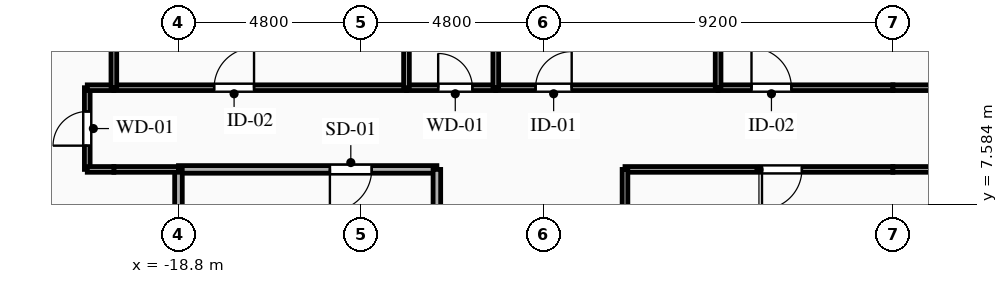
"""IFC4 building model, lengths in metres.
Left out: names, types, materials, properties, quantities, classifications, styles, units other than length and angle.
Written with IfcOpenShell. Run it as: python <this file> out.ifc"""

import sys

from ifc_helpers import new_model, si_unit, direction, frame, frame_2d, origin, place, context, subcontext, project, spatial, rectangle, extrude, element, fill, save


model = new_model("IFC4")
c1 = context("Model", 3, precision=1e-05, world=origin(), true_north=direction((0.0, 1.0)))
c2 = subcontext(c1, "Body", "Model", "MODEL_VIEW")
j1 = project(units=[si_unit("LENGTHUNIT", "METRE"), si_unit("PLANEANGLEUNIT", "RADIAN")], contexts=[c1])
p1 = place(None, origin())
s1 = spatial("IfcSite", under=j1, at=p1, CompositionType="ELEMENT")
p2 = place(p1, origin())
s2 = spatial("IfcBuilding", under=s1, at=p2, CompositionType="ELEMENT")
p3 = place(p2, frame((0.0, 0.0, 255.1)))
s3 = spatial("IfcBuildingStorey", under=s2, at=p3, CompositionType="ELEMENT", Elevation=255.1)
p4 = place(p3, frame((-12.0, 8.5, 0.0), z_axis=(0.0, 0.0, 1.0), x_axis=(-1.0, 0.0, 0.0)))
e1 = element("IfcWall", 1, at=p4, inside=s3, PredefinedType="PARTITIONING", context=c2, shape_type="SweptSolid", body=[
    extrude(rectangle(XDim=6.8, YDim=0.2, at=frame_2d((3.4, 0.0))), origin(), (0.0, 0.0, 1.0), 3.04),
])
p5 = place(p4, frame((1.715, 0.0, 0.0)))
e2 = element("IfcOpeningElement", 2, at=p5, cuts=e1, PredefinedType="OPENING", context=c2, shape_type="SweptSolid", body=[
    extrude(rectangle(XDim=1.1, YDim=2.15, at=frame_2d((0.55, 1.075))), frame((0.0, 0.11, 0.0), z_axis=(0.0, -1.0, 0.0), x_axis=(1.0, 0.0, 0.0)), (0.0, 0.0, 1.0), 0.22),
])
p6 = place(p3, frame((-12.0, 5.6, 0.0), z_axis=(0.0, 0.0, 1.0), x_axis=(0.0, 1.0, 0.0)))
e3 = element("IfcWall", 3, at=p6, inside=s3, PredefinedType="PARTITIONING", context=c2, shape_type="SweptSolid", body=[
    extrude(rectangle(XDim=2.9, YDim=0.2, at=frame_2d((1.45, 0.0))), origin(), (0.0, 0.0, 1.0), 3.04),
])
p7 = place(p3, frame((-18.8, 8.5, 0.0), z_axis=(0.0, 0.0, 1.0), x_axis=(0.0, -1.0, 0.0)))
e4 = element("IfcWall", 4, at=p7, inside=s3, PredefinedType="PARTITIONING", context=c2, shape_type="SweptSolid", body=[
    extrude(rectangle(XDim=2.9, YDim=0.2, at=frame_2d((1.45, 0.0))), origin(), (0.0, 0.0, 1.0), 2.665),
])
p8 = place(p3, frame((-21.2, 8.5, 0.0), z_axis=(0.0, 0.0, 1.0), x_axis=(0.0, 1.0, 0.0)))
e5 = element("IfcWall", 5, at=p8, inside=s3, PredefinedType="PARTITIONING", context=c2, shape_type="SweptSolid", body=[
    extrude(rectangle(XDim=2.15, YDim=0.15, at=frame_2d((1.075, 0.0))), origin(), (0.0, 0.0, 1.0), 2.695),
])
p9 = place(p8, frame((0.625, 0.0, 0.0)))
e6 = element("IfcOpeningElement", 6, at=p9, cuts=e5, PredefinedType="OPENING", context=c2, shape_type="SweptSolid", body=[
    extrude(rectangle(XDim=0.9, YDim=2.1, at=frame_2d((0.45, 1.05))), frame((0.0, 0.085, 0.0), z_axis=(0.0, -1.0, 0.0), x_axis=(1.0, 0.0, 0.0)), (0.0, 0.0, 1.0), 0.17),
])
p10 = place(p3, frame((-18.8, 8.5, 0.0), z_axis=(0.0, 0.0, 1.0), x_axis=(-1.0, 0.0, 0.0)))
e7 = element("IfcWall", 7, at=p10, inside=s3, PredefinedType="PARTITIONING", context=c2, shape_type="SweptSolid", body=[
    extrude(rectangle(XDim=1.7, YDim=0.15, at=frame_2d((0.85, 0.0))), origin(), (0.0, 0.0, 1.0), 3.04),
])
for number, where, z_axis, x_axis in (
    (8, (-20.5, 8.5, 0.0), (0.0, 0.0, 1.0), (-1.0, 0.0, 0.0)),
    (9, (-21.2, 10.65, 0.0), (0.0, 0.0, 1.0), (1.0, 0.0, 0.0)),
):
    element("IfcWall", number, at=place(p3, frame(where, z_axis=z_axis, x_axis=x_axis)), inside=s3, PredefinedType="PARTITIONING", context=c2, shape_type="SweptSolid", body=[
        extrude(rectangle(XDim=0.7, YDim=0.15, at=frame_2d((0.35, 0.0))), origin(), (0.0, 0.0, 1.0), 3.04),
    ])
p11 = place(p3, frame((-20.5, 10.65, 0.0), z_axis=(0.0, 0.0, 1.0), x_axis=(1.0, 0.0, 0.0)))
e10 = element("IfcWall", 10, at=p11, inside=s3, PredefinedType="PARTITIONING", context=c2, shape_type="SweptSolid", body=[
    extrude(rectangle(XDim=7.7, YDim=0.15, at=frame_2d((3.85, 0.0))), origin(), (0.0, 0.0, 1.0), 3.04),
])
p12 = place(p11, frame((2.639, 0.0, 0.0)))
e11 = element("IfcOpeningElement", 11, at=p12, cuts=e10, PredefinedType="OPENING", context=c2, shape_type="SweptSolid", body=[
    extrude(rectangle(XDim=1.05, YDim=2.15, at=frame_2d((0.525, 1.075))), frame((0.0, 0.085, 0.0), z_axis=(0.0, -1.0, 0.0), x_axis=(1.0, 0.0, 0.0)), (0.0, 0.0, 1.0), 0.17),
])
p13 = place(p3, frame((-12.8, 10.65, 0.0), z_axis=(0.0, 0.0, 1.0), x_axis=(1.0, 0.0, 0.0)))
e12 = element("IfcWall", 12, at=p13, inside=s3, PredefinedType="PLUMBINGWALL", context=c2, shape_type="SweptSolid", body=[
    extrude(rectangle(XDim=2.35, YDim=0.15, at=frame_2d((1.175, 0.0))), origin(), (0.0, 0.0, 1.0), 3.04),
])
p14 = place(p13, frame((0.834, 0.0, 0.0)))
e13 = element("IfcOpeningElement", 13, at=p14, cuts=e12, PredefinedType="OPENING", context=c2, shape_type="SweptSolid", body=[
    extrude(rectangle(XDim=0.9, YDim=2.1, at=frame_2d((0.45, 1.05))), frame((0.0, 0.085, 0.0), z_axis=(0.0, -1.0, 0.0), x_axis=(1.0, 0.0, 0.0)), (0.0, 0.0, 1.0), 0.17),
])
p15 = place(p3, frame((-10.45, 10.65, 0.0), z_axis=(0.0, 0.0, 1.0), x_axis=(1.0, 0.0, 0.0)))
e14 = element("IfcWall", 14, at=p15, inside=s3, PredefinedType="PARTITIONING", context=c2, shape_type="SweptSolid", body=[
    extrude(rectangle(XDim=5.85, YDim=0.15, at=frame_2d((2.925, 0.0))), origin(), (0.0, 0.0, 1.0), 3.04),
])
p16 = place(p15, frame((1.048, 0.0, 0.0)))
e15 = element("IfcOpeningElement", 15, at=p16, cuts=e14, PredefinedType="OPENING", context=c2, shape_type="SweptSolid", body=[
    extrude(rectangle(XDim=0.95, YDim=2.1, at=frame_2d((0.475, 1.05))), frame((0.0, 0.085, 0.0), z_axis=(0.0, -1.0, 0.0), x_axis=(1.0, 0.0, 0.0)), (0.0, 0.0, 1.0), 0.17),
])
p17 = place(p3, frame((-4.6, 10.65, 0.0), z_axis=(0.0, 0.0, 1.0), x_axis=(1.0, 0.0, 0.0)))
e16 = element("IfcWall", 16, at=p17, inside=s3, PredefinedType="PARTITIONING", context=c2, shape_type="SweptSolid", body=[
    extrude(rectangle(XDim=4.6, YDim=0.15, at=frame_2d((2.3, 0.0))), origin(), (0.0, 0.0, 1.0), 3.04),
])
p18 = place(p17, frame((0.879, 0.0, 0.0)))
e17 = element("IfcOpeningElement", 17, at=p18, cuts=e16, PredefinedType="OPENING", context=c2, shape_type="SweptSolid", body=[
    extrude(rectangle(XDim=1.05, YDim=2.15, at=frame_2d((0.525, 1.075))), frame((0.0, 0.085, 0.0), z_axis=(0.0, -1.0, 0.0), x_axis=(1.0, 0.0, 0.0)), (0.0, 0.0, 1.0), 0.17),
])
p19 = place(p3, frame((0.0, 8.5, 0.0), z_axis=(0.0, 0.0, 1.0), x_axis=(-1.0, 0.0, 0.0)))
e18 = element("IfcWall", 18, at=p19, inside=s3, PredefinedType="PARTITIONING", context=c2, shape_type="SweptSolid", body=[
    extrude(rectangle(XDim=7.05, YDim=0.15, at=frame_2d((3.525, 0.0))), origin(), (0.0, 0.0, 1.0), 3.04),
])
p20 = place(p19, frame((2.395, 0.0, 0.0)))
e19 = element("IfcOpeningElement", 19, at=p20, cuts=e18, PredefinedType="OPENING", context=c2, shape_type="SweptSolid", body=[
    extrude(rectangle(XDim=1.05, YDim=2.15, at=frame_2d((0.525, 1.075))), frame((0.0, 0.085, 0.0), z_axis=(0.0, -1.0, 0.0), x_axis=(1.0, 0.0, 0.0)), (0.0, 0.0, 1.0), 0.17),
])
p21 = place(p3, frame((0.0, 10.65, 0.0), z_axis=(0.0, 0.0, 1.0), x_axis=(1.0, 0.0, 0.0)))
e20 = element("IfcWall", 20, at=p21, inside=s3, PredefinedType="PARTITIONING", context=c2, shape_type="SweptSolid", body=[
    extrude(rectangle(XDim=3.6, YDim=0.15, at=frame_2d((1.8, 0.0))), origin(), (0.0, 0.0, 1.0), 3.04),
])
for number, where, z_axis, x_axis in (
    (21, (7.05, 8.5, 0.0), (0.0, 0.0, 1.0), (-1.0, 0.0, 0.0)),
    (22, (-7.05, 8.5, 0.0), (0.0, 0.0, 1.0), (0.0, -1.0, 0.0)),
):
    element("IfcWall", number, at=place(p3, frame(where, z_axis=z_axis, x_axis=x_axis)), inside=s3, PredefinedType="PARTITIONING", context=c2, shape_type="SweptSolid", body=[
        extrude(rectangle(XDim=7.05, YDim=0.15, at=frame_2d((3.525, 0.0))), origin(), (0.0, 0.0, 1.0), 3.04),
    ])
p22 = place(p3, frame((-20.5, 15.2, 0.0), z_axis=(0.0, 0.0, 1.0), x_axis=(0.0, -1.0, 0.0)))
e23 = element("IfcWall", 23, at=p22, inside=s3, PredefinedType="PARTITIONING", context=c2, shape_type="SweptSolid", body=[
    extrude(rectangle(XDim=4.55, YDim=0.15, at=frame_2d((2.275, 0.0))), origin(), (0.0, 0.0, 1.0), 2.665),
])
for number, where, z_axis, x_axis in (
    (24, (-12.8, 15.2, 0.0), (0.0, 0.0, 1.0), (0.0, -1.0, 0.0)),
    (25, (-10.45, 15.2, 0.0), (0.0, 0.0, 1.0), (0.0, -1.0, 0.0)),
):
    element("IfcWall", number, at=place(p3, frame(where, z_axis=z_axis, x_axis=x_axis)), inside=s3, PredefinedType="PLUMBINGWALL", context=c2, shape_type="SweptSolid", body=[
        extrude(rectangle(XDim=4.55, YDim=0.15, at=frame_2d((2.275, 0.0))), origin(), (0.0, 0.0, 1.0), 3.04),
    ])
p23 = place(p3, frame((-4.6, 15.2, 0.0), z_axis=(0.0, 0.0, 1.0), x_axis=(0.0, -1.0, 0.0)))
e26 = element("IfcWall", 26, at=p23, inside=s3, PredefinedType="PARTITIONING", context=c2, shape_type="SweptSolid", body=[
    extrude(rectangle(XDim=4.55, YDim=0.15, at=frame_2d((2.275, 0.0))), origin(), (0.0, 0.0, 1.0), 3.04),
])
p24 = place(p5, origin())
e27 = element("IfcDoor", 27, at=p24, inside=s3, OperationType="SINGLE_SWING_RIGHT", PredefinedType="DOOR", context=c2, shape_type="SweptSolid", body=[
    extrude(rectangle(XDim=1.1, YDim=2.15, at=frame_2d((0.55, 1.075))), frame((0.0, 0.025, 0.0), z_axis=(0.0, -1.0, 0.0), x_axis=(1.0, 0.0, 0.0)), (0.0, 0.0, 1.0), 0.05),
])
fill(e2, e27)
p25 = place(p9, origin())
e28 = element("IfcDoor", 28, at=p25, inside=s3, OperationType="SINGLE_SWING_LEFT", PredefinedType="DOOR", context=c2, shape_type="SweptSolid", body=[
    extrude(rectangle(XDim=0.9, YDim=2.1, at=frame_2d((0.45, 1.05))), frame((0.0, 0.025, 0.0), z_axis=(0.0, -1.0, 0.0), x_axis=(1.0, 0.0, 0.0)), (0.0, 0.0, 1.0), 0.05),
])
fill(e6, e28)
p26 = place(p12, origin())
e29 = element("IfcDoor", 29, at=p26, inside=s3, OperationType="SINGLE_SWING_RIGHT", PredefinedType="DOOR", context=c2, shape_type="SweptSolid", body=[
    extrude(rectangle(XDim=1.05, YDim=2.15, at=frame_2d((0.525, 1.075))), frame((0.0, 0.025, 0.0), z_axis=(0.0, -1.0, 0.0), x_axis=(1.0, 0.0, 0.0)), (0.0, 0.0, 1.0), 0.05),
])
fill(e11, e29)
p27 = place(p14, origin())
e30 = element("IfcDoor", 30, at=p27, inside=s3, OperationType="SINGLE_SWING_LEFT", PredefinedType="DOOR", context=c2, shape_type="SweptSolid", body=[
    extrude(rectangle(XDim=0.9, YDim=2.1, at=frame_2d((0.45, 1.05))), frame((0.0, 0.025, 0.0), z_axis=(0.0, -1.0, 0.0), x_axis=(1.0, 0.0, 0.0)), (0.0, 0.0, 1.0), 0.05),
])
fill(e13, e30)
p28 = place(p16, origin())
e31 = element("IfcDoor", 31, at=p28, inside=s3, OperationType="SINGLE_SWING_RIGHT", PredefinedType="DOOR", context=c2, shape_type="SweptSolid", body=[
    extrude(rectangle(XDim=0.95, YDim=2.1, at=frame_2d((0.475, 1.05))), frame((0.0, 0.025, 0.0), z_axis=(0.0, -1.0, 0.0), x_axis=(1.0, 0.0, 0.0)), (0.0, 0.0, 1.0), 0.05),
])
fill(e15, e31)
p29 = place(p18, origin())
e32 = element("IfcDoor", 32, at=p29, inside=s3, OperationType="SINGLE_SWING_LEFT", PredefinedType="DOOR", context=c2, shape_type="SweptSolid", body=[
    extrude(rectangle(XDim=1.05, YDim=2.15, at=frame_2d((0.525, 1.075))), frame((0.0, 0.025, 0.0), z_axis=(0.0, -1.0, 0.0), x_axis=(1.0, 0.0, 0.0)), (0.0, 0.0, 1.0), 0.05),
])
fill(e17, e32)
p30 = place(p20, origin())
e33 = element("IfcDoor", 33, at=p30, inside=s3, OperationType="SINGLE_SWING_RIGHT", PredefinedType="DOOR", context=c2, shape_type="SweptSolid", body=[
    extrude(rectangle(XDim=1.05, YDim=2.15, at=frame_2d((0.525, 1.075))), frame((0.0, 0.025, 0.0), z_axis=(0.0, -1.0, 0.0), x_axis=(1.0, 0.0, 0.0)), (0.0, 0.0, 1.0), 0.05),
])
fill(e19, e33)
save(model, sys.argv[1])
